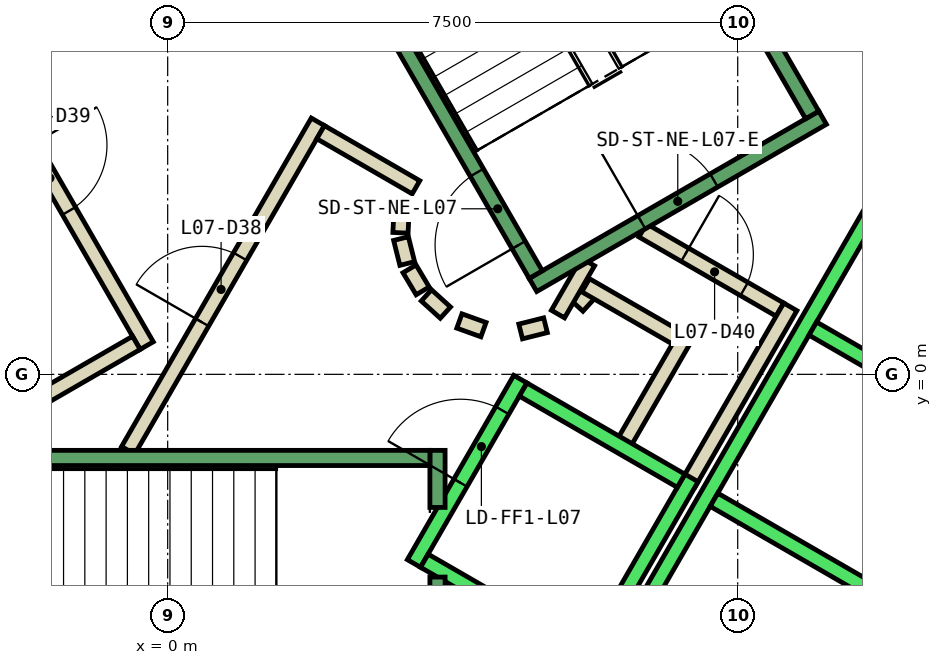
"""IFC4 building model, lengths in metres.
Left out: names, types, materials, properties, quantities, classifications, styles, units other than length and angle.
Written with IfcOpenShell. Run it as: python <this file> out.ifc"""

import sys

from ifc_helpers import new_model, si_unit, direction, frame, frame_2d, origin, place, context, subcontext, project, spatial, polyline, rectangle, outline, extrude, element, fill, save


model = new_model("IFC4")
c1 = context("Model", 3, precision=1e-05, world=origin(), true_north=direction((0.0, 1.0)))
c2 = subcontext(c1, "Body", "Model", "MODEL_VIEW")
j1 = project(units=[si_unit("LENGTHUNIT", "METRE"), si_unit("PLANEANGLEUNIT", "RADIAN")], contexts=[c1])
p1 = place(None, origin())
s1 = spatial("IfcSite", under=j1, at=p1, CompositionType="ELEMENT")
p2 = place(p1, origin())
s2 = spatial("IfcBuilding", under=s1, at=p2, CompositionType="ELEMENT")
p3 = place(p2, frame((0.0, 0.0, 39.2)))
s3 = spatial("IfcBuildingStorey", under=s2, at=p3, CompositionType="ELEMENT", Elevation=39.2)
p4 = place(p3, frame((0.0, 0.0, -0.4)))
e1 = element("IfcWall", 1, at=p4, inside=s3, PredefinedType="SHEAR", context=c2, shape_type="SweptSolid", body=[
    extrude(outline(polyline([(8.517, 11.748), (7.651, 11.248), (12.702, 2.5), (13.856, 2.5), (8.517, 11.748)])), origin(), (0.0, 0.0, 1.0), 4.2),
])
p5 = place(p3, frame((5.39, 0.898, 0.0), z_axis=(0.0, 0.0, 1.0), x_axis=(0.673828488714, 0.738887791073, 0.0)))
e2 = element("IfcWall", 2, at=p5, inside=s3, PredefinedType="PARTITIONING", context=c2, shape_type="SweptSolid", body=[
    extrude(rectangle(XDim=0.263, YDim=0.2, at=frame_2d((0.131, 0.0))), origin(), (0.0, 0.0, 1.0), 3.8),
])
p6 = place(p3, frame((5.499, 1.172, 0.0), z_axis=(0.0, 0.0, 1.0), x_axis=(0.866333505267, -0.499465972466, 0.0)))
e3 = element("IfcWall", 3, at=p6, inside=s3, PredefinedType="PARTITIONING", context=c2, shape_type="SweptSolid", body=[
    extrude(rectangle(XDim=1.374, YDim=0.2, at=frame_2d((0.687, 0.0))), origin(), (0.0, 0.0, 1.0), 3.8),
])
p7 = place(p3, frame((6.826, 0.522, 0.0), z_axis=(0.0, 0.0, 1.0), x_axis=(-0.500016722714, -0.866015748706, 0.0)))
e4 = element("IfcWall", 4, at=p7, inside=s3, PredefinedType="PARTITIONING", context=c2, shape_type="SweptSolid", body=[
    extrude(rectangle(XDim=1.7, YDim=0.2, at=frame_2d((0.85, 0.0))), origin(), (0.0, 0.0, 1.0), 3.8),
])
p8 = place(p3, frame((6.25, 1.894, 0.0), z_axis=(0.0, 0.0, 1.0), x_axis=(0.866043184279, -0.499969202016, 0.0)))
e5 = element("IfcWall", 5, at=p8, inside=s3, PredefinedType="PARTITIONING", context=c2, shape_type="SweptSolid", body=[
    extrude(rectangle(XDim=2.084, YDim=0.2, at=frame_2d((1.042, 0.0))), origin(), (0.0, 0.0, 1.0), 3.8),
])
p9 = place(p8, frame((0.642, 0.0, 0.0)))
e6 = element("IfcOpeningElement", 6, at=p9, cuts=e5, PredefinedType="OPENING", context=c2, shape_type="SweptSolid", body=[
    extrude(rectangle(XDim=0.9, YDim=2.1, at=frame_2d((0.45, 1.05))), frame((0.0, 0.11, 0.0), z_axis=(0.0, -1.0, 0.0), x_axis=(1.0, 0.0, 0.0)), (0.0, 0.0, 1.0), 0.22),
])
p10 = place(p3, frame((8.192, 0.888, 0.0), z_axis=(0.0, 0.0, 1.0), x_axis=(-0.499940625693, -0.866059680843, 0.0)))
e7 = element("IfcWall", 7, at=p10, inside=s3, PredefinedType="PARTITIONING", context=c2, shape_type="SweptSolid", body=[
    extrude(rectangle(XDim=2.68, YDim=0.2, at=frame_2d((1.34, 0.0))), origin(), (0.0, 0.0, 1.0), 3.8),
])
p11 = place(p3, frame((5.135, 0.793, 0.0), z_axis=(0.0, 0.0, 1.0), x_axis=(0.499526442893, 0.866298639529, 0.0)))
e8 = element("IfcWall", 8, at=p11, inside=s3, PredefinedType="PARTITIONING", context=c2, shape_type="SweptSolid", body=[
    extrude(rectangle(XDim=0.791, YDim=0.2, at=frame_2d((0.396, 0.0))), origin(), (0.0, 0.0, 1.0), 3.8),
])
p12 = place(p3, frame((-0.52, -1.0, 0.0), z_axis=(0.0, 0.0, 1.0), x_axis=(0.50011622646, 0.865958290007, 0.0)))
e9 = element("IfcWall", 9, at=p12, inside=s3, PredefinedType="PARTITIONING", context=c2, shape_type="SweptSolid", body=[
    extrude(rectangle(XDim=4.991, YDim=0.2, at=frame_2d((2.496, 0.0))), origin(), (0.0, 0.0, 1.0), 3.8),
])
p13 = place(p12, frame((1.945, 0.0, 0.0)))
e10 = element("IfcOpeningElement", 10, at=p13, cuts=e9, PredefinedType="OPENING", context=c2, shape_type="SweptSolid", body=[
    extrude(rectangle(XDim=1.0, YDim=2.1, at=frame_2d((0.5, 1.05))), frame((0.0, 0.11, 0.0), z_axis=(0.0, -1.0, 0.0), x_axis=(1.0, 0.0, 0.0)), (0.0, 0.0, 1.0), 0.22),
])
p14 = place(p3, frame((2.012, 3.186, 0.0), z_axis=(0.0, 0.0, 1.0), x_axis=(0.865891012941, -0.500232699559, 0.0)))
e11 = element("IfcWall", 11, at=p14, inside=s3, PredefinedType="PARTITIONING", context=c2, shape_type="SweptSolid", body=[
    extrude(rectangle(XDim=1.449, YDim=0.2, at=frame_2d((0.725, 0.0))), origin(), (0.0, 0.0, 1.0), 3.8),
])
p15 = place(p3, frame((3.079, 2.199, 0.0), z_axis=(0.0, 0.0, 1.0), x_axis=(-0.047771483479, -0.998858290933, 0.0)))
e12 = element("IfcWall", 12, at=p15, inside=s3, PredefinedType="PARTITIONING", context=c2, shape_type="SweptSolid", body=[
    extrude(rectangle(XDim=0.337, YDim=0.2, at=frame_2d((0.169, 0.0))), origin(), (0.0, 0.0, 1.0), 3.8),
])
p16 = place(p3, frame((3.07, 1.786, 0.0), z_axis=(0.0, 0.0, 1.0), x_axis=(0.242705583207, -0.970099994784, 0.0)))
e13 = element("IfcWall", 13, at=p16, inside=s3, PredefinedType="PARTITIONING", context=c2, shape_type="SweptSolid", body=[
    extrude(rectangle(XDim=0.338, YDim=0.2, at=frame_2d((0.169, 0.0))), origin(), (0.0, 0.0, 1.0), 3.8),
])
for number, where, z_axis, x_axis in (
    (14, (3.182, 1.388, 0.0), (0.0, 0.0, 1.0), (0.512, -0.859, 0.0)),
    (15, (3.404, 1.039, 0.0), (0.0, 0.0, 1.0), (0.74, -0.672, 0.0)),
):
    element("IfcWall", number, at=place(p3, frame(where, z_axis=z_axis, x_axis=x_axis)), inside=s3, PredefinedType="PARTITIONING", context=c2, shape_type="SweptSolid", body=[
        extrude(rectangle(XDim=0.338, YDim=0.2, at=frame_2d((0.169, 0.0))), origin(), (0.0, 0.0, 1.0), 3.8),
    ])
p17 = place(p3, frame((3.838, 0.702, 0.0), z_axis=(0.0, 0.0, 1.0), x_axis=(0.941035081519, -0.338308993895, 0.0)))
e16 = element("IfcWall", 16, at=p17, inside=s3, PredefinedType="PARTITIONING", context=c2, shape_type="SweptSolid", body=[
    extrude(rectangle(XDim=0.337, YDim=0.2, at=frame_2d((0.168, 0.0))), origin(), (0.0, 0.0, 1.0), 3.8),
])
p18 = place(p3, frame((4.644, 0.564, 0.0), z_axis=(0.0, 0.0, 1.0), x_axis=(0.969929076366, 0.243387729394, 0.0)))
e17 = element("IfcWall", 17, at=p18, inside=s3, PredefinedType="PARTITIONING", context=c2, shape_type="SweptSolid", body=[
    extrude(rectangle(XDim=0.337, YDim=0.2, at=frame_2d((0.168, 0.0))), origin(), (0.0, 0.0, 1.0), 3.8),
])
p19 = place(p3, frame((-2.771, 4.7, 0.0), z_axis=(0.0, 0.0, 1.0), x_axis=(0.499969479948, -0.866043023828, 0.0)))
e18 = element("IfcWall", 18, at=p19, inside=s3, PredefinedType="PARTITIONING", context=c2, shape_type="SweptSolid", body=[
    extrude(rectangle(XDim=4.99, YDim=0.2, at=frame_2d((2.495, 0.0))), origin(), (0.0, 0.0, 1.0), 3.8),
])
p20 = place(p19, frame((1.945, 0.0, 0.0)))
e19 = element("IfcOpeningElement", 19, at=p20, cuts=e18, PredefinedType="OPENING", context=c2, shape_type="SweptSolid", body=[
    extrude(rectangle(XDim=1.0, YDim=2.1, at=frame_2d((0.5, 1.05))), frame((0.0, 0.11, 0.0), z_axis=(0.0, -1.0, 0.0), x_axis=(1.0, 0.0, 0.0)), (0.0, 0.0, 1.0), 0.22),
])
p21 = place(p3, frame((-0.412, 0.414, 0.0), z_axis=(0.0, 0.0, 1.0), x_axis=(-0.866017369001, -0.500013916395, 0.0)))
e20 = element("IfcWall", 20, at=p21, inside=s3, PredefinedType="PARTITIONING", context=c2, shape_type="SweptSolid", body=[
    extrude(rectangle(XDim=1.45, YDim=0.2, at=frame_2d((0.725, 0.0))), origin(), (0.0, 0.0, 1.0), 3.8),
])
p22 = place(p3, frame((3.24, -2.488, 0.0), z_axis=(0.0, 0.0, 1.0), x_axis=(0.49994636267, 0.866056369097, 0.0)))
e21 = element("IfcWall", 21, at=p22, inside=s3, PredefinedType="STANDARD", context=c2, shape_type="SweptSolid", body=[
    extrude(rectangle(XDim=2.8, YDim=0.2, at=frame_2d((1.4, 0.0))), origin(), (0.0, 0.0, 1.0), 3.8),
])
p23 = place(p22, frame((1.225, 0.0, 0.0)))
e22 = element("IfcOpeningElement", 22, at=p23, cuts=e21, PredefinedType="OPENING", context=c2, shape_type="SweptSolid", body=[
    extrude(rectangle(XDim=1.1, YDim=2.1, at=frame_2d((0.55, 1.05))), frame((0.0, 0.11, 0.0), z_axis=(0.0, -1.0, 0.0), x_axis=(1.0, 0.0, 0.0)), (0.0, 0.0, 1.0), 0.22),
])
p24 = place(p3, frame((5.492, -3.788, 0.0), z_axis=(0.0, 0.0, 1.0), x_axis=(0.500011755427, 0.866018616679, 0.0)))
e23 = element("IfcWall", 23, at=p24, inside=s3, PredefinedType="STANDARD", context=c2, shape_type="SweptSolid", body=[
    extrude(rectangle(XDim=2.8, YDim=0.2, at=frame_2d((1.4, 0.0))), origin(), (0.0, 0.0, 1.0), 3.8),
])
p25 = place(p3, frame((3.377, -2.452, 0.0), z_axis=(0.0, 0.0, 1.0), x_axis=(0.865955154139, -0.50012165622, 0.0)))
e24 = element("IfcWall", 24, at=p25, inside=s3, PredefinedType="STANDARD", context=c2, shape_type="SweptSolid", body=[
    extrude(rectangle(XDim=2.4, YDim=0.2, at=frame_2d((1.2, 0.0))), origin(), (0.0, 0.0, 1.0), 3.8),
])
p26 = place(p3, frame((4.677, -0.2, 0.0), z_axis=(0.0, 0.0, 1.0), x_axis=(0.865973769406, -0.500089422704, 0.0)))
e25 = element("IfcWall", 25, at=p26, inside=s3, PredefinedType="STANDARD", context=c2, shape_type="SweptSolid", body=[
    extrude(rectangle(XDim=2.399, YDim=0.2, at=frame_2d((1.2, 0.0))), origin(), (0.0, 0.0, 1.0), 3.8),
])
p27 = place(p3, frame((4.451, -6.19, 0.0), z_axis=(0.0, 0.0, 1.0), x_axis=(0.50000090737, 0.866024879913, 0.0)))
e26 = element("IfcWall", 26, at=p27, inside=s3, PredefinedType="STANDARD", context=c2, shape_type="SweptSolid", body=[
    extrude(rectangle(XDim=10.6, YDim=0.2, at=frame_2d((5.3, 0.0))), origin(), (0.0, 0.0, 1.0), 3.8),
])
for number, where, z_axis, x_axis in (
    (27, (7.188, -1.65, 0.0), (0.0, 0.0, 1.0), (0.866, -0.5, 0.0)),
    (28, (8.488, 0.602, 0.0), (0.0, 0.0, 1.0), (0.866, -0.5, 0.0)),
):
    element("IfcWall", number, at=place(p3, frame(where, z_axis=z_axis, x_axis=x_axis)), inside=s3, PredefinedType="STANDARD", context=c2, shape_type="SweptSolid", body=[
        extrude(rectangle(XDim=2.5, YDim=0.2, at=frame_2d((1.25, 0.0))), origin(), (0.0, 0.0, 1.0), 3.8),
    ])
p28 = place(p3, frame((3.55, -2.667, 0.0), z_axis=(0.0, 0.0, 1.0), x_axis=(0.0, -1.0, 0.0)))
e29 = element("IfcWall", 29, at=p28, inside=s3, PredefinedType="STANDARD", context=c2, shape_type="SweptSolid", body=[
    extrude(rectangle(XDim=2.733, YDim=0.2, at=frame_2d((1.366, 0.0))), origin(), (0.0, 0.0, 1.0), 3.8),
])
p29 = place(p3, frame((3.55, -1.0, 0.0), z_axis=(0.0, 0.0, 1.0), x_axis=(0.0, -1.0, 0.0)))
e30 = element("IfcWall", 30, at=p29, inside=s3, PredefinedType="STANDARD", context=c2, shape_type="SweptSolid", body=[
    extrude(rectangle(XDim=0.751, YDim=0.2, at=frame_2d((0.375, 0.0))), origin(), (0.0, 0.0, 1.0), 3.8),
])
p30 = place(p3, frame((-3.45, -1.1, 0.0), z_axis=(0.0, 0.0, 1.0), x_axis=(1.0, 0.0, 0.0)))
e31 = element("IfcWall", 31, at=p30, inside=s3, PredefinedType="STANDARD", context=c2, shape_type="SweptSolid", body=[
    extrude(rectangle(XDim=6.9, YDim=0.2, at=frame_2d((3.45, 0.0))), origin(), (0.0, 0.0, 1.0), 3.8),
])
p31 = place(p30, frame((0.45, 0.0, 0.0)))
e32 = element("IfcOpeningElement", 32, at=p31, cuts=e31, PredefinedType="OPENING", context=c2, shape_type="SweptSolid", body=[
    extrude(rectangle(XDim=1.1, YDim=2.2, at=frame_2d((0.55, 1.1))), frame((0.0, 0.11, 0.0), z_axis=(0.0, -1.0, 0.0), x_axis=(1.0, 0.0, 0.0)), (0.0, 0.0, 1.0), 0.22),
])
p32 = place(p3, frame((4.806, 1.176, 0.0), z_axis=(0.0, 0.0, 1.0), x_axis=(0.866059941101, 0.499940174841, 0.0)))
e33 = element("IfcWall", 33, at=p32, inside=s3, PredefinedType="STANDARD", context=c2, shape_type="SweptSolid", body=[
    extrude(rectangle(XDim=4.4, YDim=0.2, at=frame_2d((2.2, 0.0))), origin(), (0.0, 0.0, 1.0), 3.8),
])
p33 = place(p32, frame((1.65, 0.0, 0.0)))
e34 = element("IfcOpeningElement", 34, at=p33, cuts=e33, PredefinedType="OPENING", context=c2, shape_type="SweptSolid", body=[
    extrude(rectangle(XDim=1.1, YDim=2.2, at=frame_2d((0.55, 1.1))), frame((0.0, 0.11, 0.0), z_axis=(0.0, -1.0, 0.0), x_axis=(1.0, 0.0, 0.0)), (0.0, 0.0, 1.0), 0.22),
])
p34 = place(p3, frame((4.843, 1.312, 0.0), z_axis=(0.0, 0.0, 1.0), x_axis=(-0.499963383562, 0.866046543262, 0.0)))
e35 = element("IfcWall", 35, at=p34, inside=s3, PredefinedType="STANDARD", context=c2, shape_type="SweptSolid", body=[
    extrude(rectangle(XDim=6.9, YDim=0.2, at=frame_2d((3.45, 0.0))), origin(), (0.0, 0.0, 1.0), 3.8),
])
p35 = place(p34, frame((0.45, 0.0, 0.0)))
e36 = element("IfcOpeningElement", 36, at=p35, cuts=e35, PredefinedType="OPENING", context=c2, shape_type="SweptSolid", body=[
    extrude(rectangle(XDim=1.1, YDim=2.2, at=frame_2d((0.55, 1.1))), frame((0.0, 0.11, 0.0), z_axis=(0.0, -1.0, 0.0), x_axis=(1.0, 0.0, 0.0)), (0.0, 0.0, 1.0), 0.22),
])
p36 = place(p3, frame((8.48, 3.412, 0.0), z_axis=(0.0, 0.0, 1.0), x_axis=(-0.499978703459, 0.866037698999, 0.0)))
e37 = element("IfcWall", 37, at=p36, inside=s3, PredefinedType="STANDARD", context=c2, shape_type="SweptSolid", body=[
    extrude(rectangle(XDim=6.9, YDim=0.2, at=frame_2d((3.45, 0.0))), origin(), (0.0, 0.0, 1.0), 3.8),
])
p37 = place(p3, frame((-1.393, 7.288, 0.0), z_axis=(0.0, 0.0, 1.0), x_axis=(-0.499963383562, -0.866046543262, 0.0)))
e38 = element("IfcWall", 38, at=p37, inside=s3, PredefinedType="STANDARD", context=c2, shape_type="SweptSolid", body=[
    extrude(rectangle(XDim=6.9, YDim=0.2, at=frame_2d((3.45, 0.0))), origin(), (0.0, 0.0, 1.0), 3.8),
])
p38 = place(p37, frame((0.45, 0.0, 0.0)))
e39 = element("IfcOpeningElement", 39, at=p38, cuts=e38, PredefinedType="OPENING", context=c2, shape_type="SweptSolid", body=[
    extrude(rectangle(XDim=1.1, YDim=2.2, at=frame_2d((0.55, 1.1))), frame((0.0, 0.11, 0.0), z_axis=(0.0, -1.0, 0.0), x_axis=(1.0, 0.0, 0.0)), (0.0, 0.0, 1.0), 0.22),
])
p39 = place(p13, origin())
e40 = element("IfcDoor", 40, at=p39, inside=s3, OperationType="SINGLE_SWING_LEFT", PredefinedType="DOOR", context=c2, shape_type="SweptSolid", body=[
    extrude(rectangle(XDim=1.0, YDim=2.1, at=frame_2d((0.5, 1.05))), frame((0.0, 0.025, 0.0), z_axis=(0.0, -1.0, 0.0), x_axis=(1.0, 0.0, 0.0)), (0.0, 0.0, 1.0), 0.05),
])
fill(e10, e40)
p40 = place(p20, origin())
e41 = element("IfcDoor", 41, at=p40, inside=s3, OperationType="SINGLE_SWING_RIGHT", PredefinedType="DOOR", context=c2, shape_type="SweptSolid", body=[
    extrude(rectangle(XDim=1.0, YDim=2.1, at=frame_2d((0.5, 1.05))), frame((0.0, 0.025, 0.0), z_axis=(0.0, -1.0, 0.0), x_axis=(1.0, 0.0, 0.0)), (0.0, 0.0, 1.0), 0.05),
])
fill(e19, e41)
p41 = place(p9, origin())
e42 = element("IfcDoor", 42, at=p41, inside=s3, OperationType="SINGLE_SWING_LEFT", PredefinedType="DOOR", context=c2, shape_type="SweptSolid", body=[
    extrude(rectangle(XDim=0.9, YDim=2.1, at=frame_2d((0.45, 1.05))), frame((0.0, 0.025, 0.0), z_axis=(0.0, -1.0, 0.0), x_axis=(1.0, 0.0, 0.0)), (0.0, 0.0, 1.0), 0.05),
])
fill(e6, e42)
p42 = place(p23, origin())
e43 = element("IfcDoor", 43, at=p42, inside=s3, OperationType="SLIDING_TO_LEFT", PredefinedType="DOOR", context=c2, shape_type="SweptSolid", body=[
    extrude(rectangle(XDim=1.1, YDim=2.1, at=frame_2d((0.55, 1.05))), frame((0.0, 0.025, 0.0), z_axis=(0.0, -1.0, 0.0), x_axis=(1.0, 0.0, 0.0)), (0.0, 0.0, 1.0), 0.05),
])
fill(e22, e43)
p43 = place(p35, origin())
e44 = element("IfcDoor", 44, at=p43, inside=s3, OperationType="SINGLE_SWING_LEFT", PredefinedType="DOOR", context=c2, shape_type="SweptSolid", body=[
    extrude(rectangle(XDim=1.1, YDim=2.2, at=frame_2d((0.55, 1.1))), frame((0.0, 0.025, 0.0), z_axis=(0.0, -1.0, 0.0), x_axis=(1.0, 0.0, 0.0)), (0.0, 0.0, 1.0), 0.05),
])
fill(e36, e44)
p44 = place(p33, origin())
e45 = element("IfcDoor", 45, at=p44, inside=s3, OperationType="SINGLE_SWING_LEFT", PredefinedType="DOOR", context=c2, shape_type="SweptSolid", body=[
    extrude(rectangle(XDim=1.1, YDim=2.2, at=frame_2d((0.55, 1.1))), frame((0.0, 0.025, 0.0), z_axis=(0.0, -1.0, 0.0), x_axis=(1.0, 0.0, 0.0)), (0.0, 0.0, 1.0), 0.05),
])
fill(e34, e45)
save(model, sys.argv[1])
